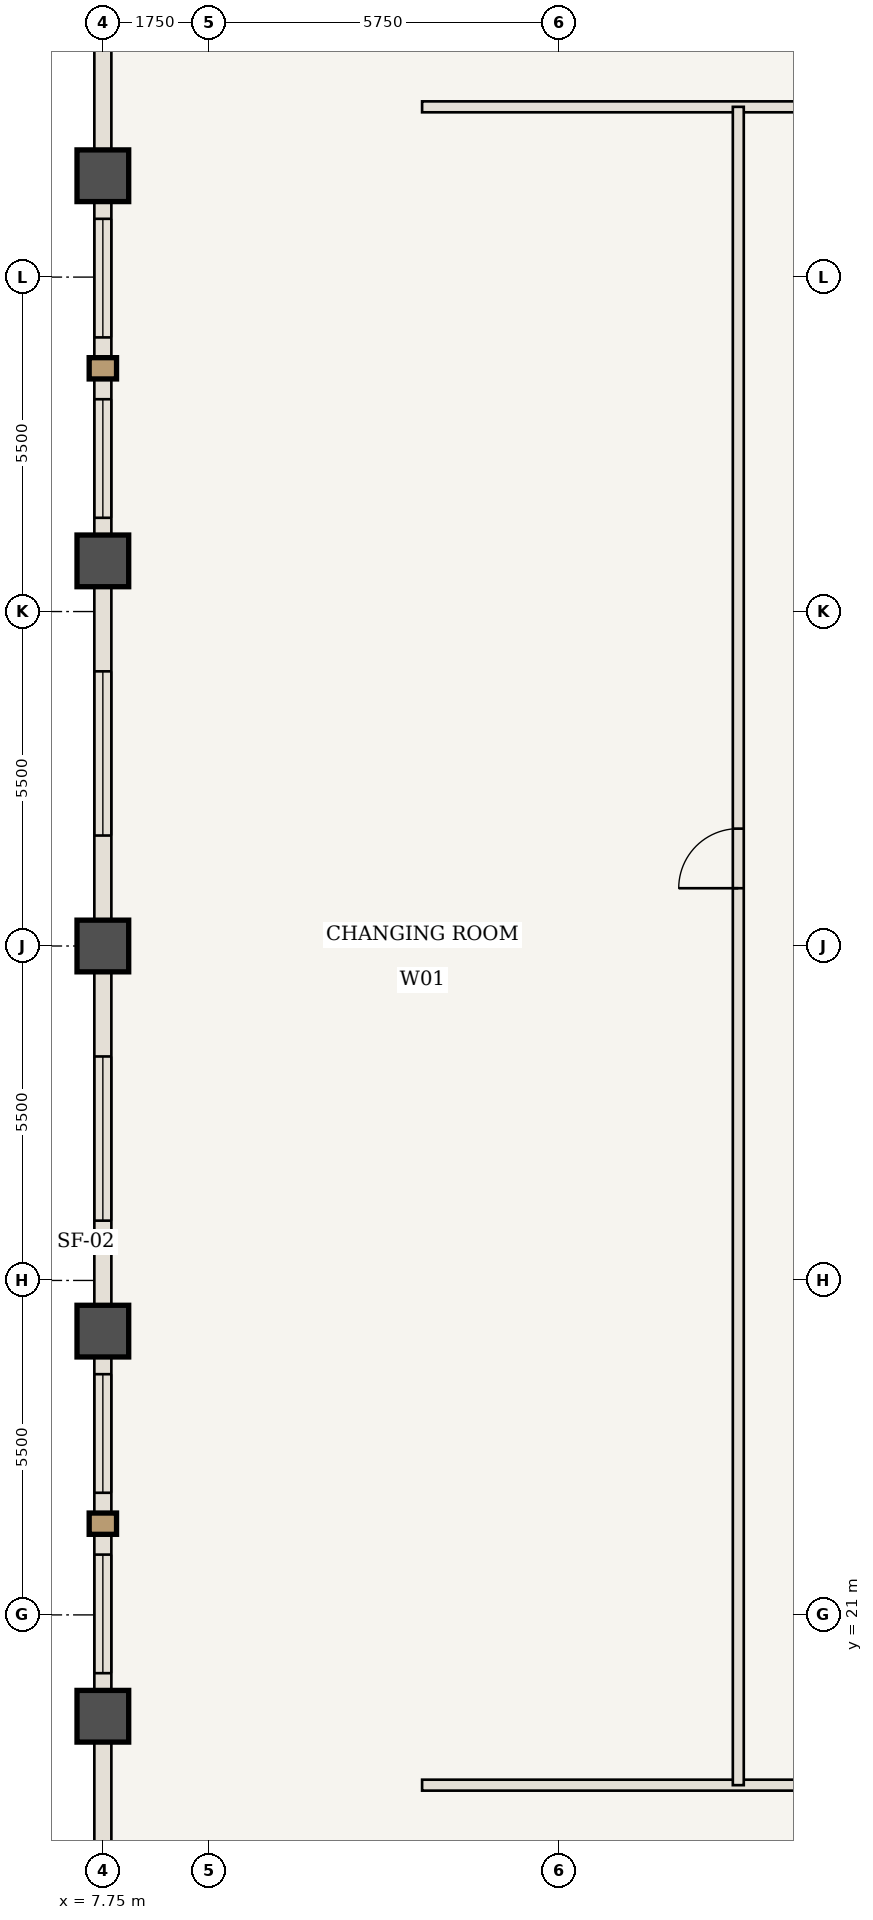
"""IFC4 building model, lengths in metres.
Left out: names, types, materials, properties, quantities, classifications, styles, units other than length and angle.
Written with IfcOpenShell. Run it as: python <this file> out.ifc"""

import sys

from ifc_helpers import new_model, si_unit, direction, frame, frame_2d, origin, origin_2d, place, context, subcontext, project, spatial, rectangle, extrude, element, fill, save


model = new_model("IFC4")
c1 = context("Model", 3, precision=1e-05, world=origin(), true_north=direction((0.0, 1.0)))
c2 = subcontext(c1, "Body", "Model", "MODEL_VIEW")
j1 = project(units=[si_unit("LENGTHUNIT", "METRE"), si_unit("PLANEANGLEUNIT", "RADIAN")], contexts=[c1])
p1 = place(None, origin())
s1 = spatial("IfcSite", under=j1, at=p1, CompositionType="ELEMENT")
p2 = place(p1, origin())
s2 = spatial("IfcBuilding", under=s1, at=p2, CompositionType="ELEMENT")
p3 = place(p2, frame((0.0, 0.0, 244.65)))
s3 = spatial("IfcBuildingStorey", under=s2, at=p3, CompositionType="ELEMENT", Elevation=244.65)
for number, where, z_axis, x_axis in (
    (1, (7.75, 19.333, 0.0), (0.0, 0.0, 1.0), (1.0, 0.0, 0.0)),
    (2, (7.75, 25.667, 0.0), (0.0, 0.0, 1.0), (1.0, 0.0, 0.0)),
    (3, (7.75, 32.0, 0.0), (0.0, 0.0, 1.0), (1.0, 0.0, 0.0)),
    (4, (7.75, 38.333, 0.0), (0.0, 0.0, 1.0), (1.0, 0.0, 0.0)),
    (5, (7.75, 44.667, 0.0), (0.0, 0.0, 1.0), (1.0, 0.0, 0.0)),
):
    element("IfcColumn", number, at=place(p3, frame(where, z_axis=z_axis, x_axis=x_axis)), inside=s3, PredefinedType="COLUMN", context=c2, shape_type="SweptSolid", body=[
        extrude(rectangle(XDim=0.85, YDim=0.85, at=origin_2d()), origin(), (0.0, 0.0, 1.0), 3.85),
    ])
p4 = place(p3, frame((13.0, 18.2, 0.0), z_axis=(0.0, 0.0, 1.0), x_axis=(1.0, 0.0, 0.0)))
e6 = element("IfcWall", 6, at=p4, inside=s3, PredefinedType="STANDARD", context=c2, shape_type="SweptSolid", body=[
    extrude(rectangle(XDim=38.0, YDim=0.18, at=frame_2d((19.0, 0.0))), origin(), (0.0, 0.0, 1.0), 3.685),
])
p5 = place(p4, frame((19.825, 0.0, 0.0)))
e7 = element("IfcOpeningElement", 7, at=p5, cuts=e6, PredefinedType="OPENING", context=c2, shape_type="SweptSolid", body=[
    extrude(rectangle(XDim=0.98, YDim=2.2, at=frame_2d((0.49, 1.1))), frame((0.0, 0.1, 0.0), z_axis=(0.0, -1.0, 0.0), x_axis=(1.0, 0.0, 0.0)), (0.0, 0.0, 1.0), 0.2),
])
p6 = place(p3, frame((13.0, 45.8, 0.0), z_axis=(0.0, 0.0, 1.0), x_axis=(1.0, 0.0, 0.0)))
e8 = element("IfcWall", 8, at=p6, inside=s3, PredefinedType="STANDARD", context=c2, shape_type="SweptSolid", body=[
    extrude(rectangle(XDim=13.592, YDim=0.18, at=frame_2d((6.796, 0.0))), origin(), (0.0, 0.0, 1.0), 3.685),
])
p7 = place(p6, frame((8.896, 0.0, 0.0)))
e9 = element("IfcOpeningElement", 9, at=p7, cuts=e8, PredefinedType="OPENING", context=c2, shape_type="SweptSolid", body=[
    extrude(rectangle(XDim=0.98, YDim=2.2, at=frame_2d((0.49, 1.1))), frame((0.0, 0.1, 0.0), z_axis=(0.0, -1.0, 0.0), x_axis=(1.0, 0.0, 0.0)), (0.0, 0.0, 1.0), 0.2),
])
p8 = place(p3, frame((18.2, 18.2, 0.0), z_axis=(0.0, 0.0, 1.0), x_axis=(0.0, 1.0, 0.0)))
e10 = element("IfcWall", 10, at=p8, inside=s3, PredefinedType="STANDARD", context=c2, shape_type="SweptSolid", body=[
    extrude(rectangle(XDim=27.6, YDim=0.18, at=frame_2d((13.8, 0.0))), origin(), (0.0, 0.0, 1.0), 3.685),
])
p9 = place(p8, frame((14.75, 0.0, 0.0)))
e11 = element("IfcOpeningElement", 11, at=p9, cuts=e10, PredefinedType="OPENING", context=c2, shape_type="SweptSolid", body=[
    extrude(rectangle(XDim=0.98, YDim=2.2, at=frame_2d((0.49, 1.1))), frame((0.0, 0.1, 0.0), z_axis=(0.0, -1.0, 0.0), x_axis=(1.0, 0.0, 0.0)), (0.0, 0.0, 1.0), 0.2),
])
p10 = place(p3, frame((7.75, 13.0, 0.0), z_axis=(0.0, 0.0, 1.0), x_axis=(0.0, 1.0, 0.0)))
e12 = element("IfcWall", 12, at=p10, inside=s3, PredefinedType="USERDEFINED", context=c2, shape_type="SweptSolid", body=[
    extrude(rectangle(XDim=6.333, YDim=0.28, at=frame_2d((3.167, 0.0))), origin(), (0.0, 0.0, 1.0), 2.985),
])
p11 = place(p3, frame((7.75, 19.333, 0.0), z_axis=(0.0, 0.0, 1.0), x_axis=(0.0, 1.0, 0.0)))
e13 = element("IfcWall", 13, at=p11, inside=s3, PredefinedType="USERDEFINED", context=c2, shape_type="SweptSolid", body=[
    extrude(rectangle(XDim=6.333, YDim=0.28, at=frame_2d((3.167, 0.0))), origin(), (0.0, 0.0, 1.0), 2.985),
])
p12 = place(p11, frame((0.708, 0.0, 0.85)))
e14 = element("IfcOpeningElement", 14, at=p12, cuts=e13, PredefinedType="OPENING", context=c2, shape_type="SweptSolid", body=[
    extrude(rectangle(XDim=1.95, YDim=1.935, at=frame_2d((0.975, 0.968))), frame((0.0, 0.15, 0.0), z_axis=(0.0, -1.0, 0.0), x_axis=(1.0, 0.0, 0.0)), (0.0, 0.0, 1.0), 0.3),
])
p13 = place(p11, frame((3.675, 0.0, 0.85)))
e15 = element("IfcOpeningElement", 15, at=p13, cuts=e13, PredefinedType="OPENING", context=c2, shape_type="SweptSolid", body=[
    extrude(rectangle(XDim=1.95, YDim=1.935, at=frame_2d((0.975, 0.968))), frame((0.0, 0.15, 0.0), z_axis=(0.0, -1.0, 0.0), x_axis=(1.0, 0.0, 0.0)), (0.0, 0.0, 1.0), 0.3),
])
p14 = place(p3, frame((7.75, 25.667, 0.0), z_axis=(0.0, 0.0, 1.0), x_axis=(0.0, 1.0, 0.0)))
e16 = element("IfcWall", 16, at=p14, inside=s3, PredefinedType="USERDEFINED", context=c2, shape_type="SweptSolid", body=[
    extrude(rectangle(XDim=6.333, YDim=0.28, at=frame_2d((3.167, 0.0))), origin(), (0.0, 0.0, 1.0), 2.985),
])
p15 = place(p14, frame((1.817, 0.0, 0.85)))
e17 = element("IfcOpeningElement", 17, at=p15, cuts=e16, PredefinedType="OPENING", context=c2, shape_type="SweptSolid", body=[
    extrude(rectangle(XDim=2.7, YDim=1.935, at=frame_2d((1.35, 0.968))), frame((0.0, 0.15, 0.0), z_axis=(0.0, -1.0, 0.0), x_axis=(1.0, 0.0, 0.0)), (0.0, 0.0, 1.0), 0.3),
])
p16 = place(p3, frame((7.75, 32.0, 0.0), z_axis=(0.0, 0.0, 1.0), x_axis=(0.0, 1.0, 0.0)))
e18 = element("IfcWall", 18, at=p16, inside=s3, PredefinedType="USERDEFINED", context=c2, shape_type="SweptSolid", body=[
    extrude(rectangle(XDim=6.333, YDim=0.28, at=frame_2d((3.167, 0.0))), origin(), (0.0, 0.0, 1.0), 2.985),
])
p17 = place(p16, frame((1.817, 0.0, 0.85)))
e19 = element("IfcOpeningElement", 19, at=p17, cuts=e18, PredefinedType="OPENING", context=c2, shape_type="SweptSolid", body=[
    extrude(rectangle(XDim=2.7, YDim=1.935, at=frame_2d((1.35, 0.968))), frame((0.0, 0.15, 0.0), z_axis=(0.0, -1.0, 0.0), x_axis=(1.0, 0.0, 0.0)), (0.0, 0.0, 1.0), 0.3),
])
p18 = place(p3, frame((7.75, 38.333, 0.0), z_axis=(0.0, 0.0, 1.0), x_axis=(0.0, 1.0, 0.0)))
e20 = element("IfcWall", 20, at=p18, inside=s3, PredefinedType="USERDEFINED", context=c2, shape_type="SweptSolid", body=[
    extrude(rectangle(XDim=6.333, YDim=0.28, at=frame_2d((3.167, 0.0))), origin(), (0.0, 0.0, 1.0), 2.985),
])
p19 = place(p18, frame((0.708, 0.0, 0.85)))
e21 = element("IfcOpeningElement", 21, at=p19, cuts=e20, PredefinedType="OPENING", context=c2, shape_type="SweptSolid", body=[
    extrude(rectangle(XDim=1.95, YDim=1.935, at=frame_2d((0.975, 0.968))), frame((0.0, 0.15, 0.0), z_axis=(0.0, -1.0, 0.0), x_axis=(1.0, 0.0, 0.0)), (0.0, 0.0, 1.0), 0.3),
])
p20 = place(p18, frame((3.675, 0.0, 0.85)))
e22 = element("IfcOpeningElement", 22, at=p20, cuts=e20, PredefinedType="OPENING", context=c2, shape_type="SweptSolid", body=[
    extrude(rectangle(XDim=1.95, YDim=1.935, at=frame_2d((0.975, 0.968))), frame((0.0, 0.15, 0.0), z_axis=(0.0, -1.0, 0.0), x_axis=(1.0, 0.0, 0.0)), (0.0, 0.0, 1.0), 0.3),
])
p21 = place(p3, frame((7.75, 44.667, 0.0), z_axis=(0.0, 0.0, 1.0), x_axis=(0.0, 1.0, 0.0)))
e23 = element("IfcWall", 23, at=p21, inside=s3, PredefinedType="USERDEFINED", context=c2, shape_type="SweptSolid", body=[
    extrude(rectangle(XDim=6.333, YDim=0.28, at=frame_2d((3.167, 0.0))), origin(), (0.0, 0.0, 1.0), 2.985),
])
p22 = place(p9, origin())
e24 = element("IfcDoor", 24, at=p22, inside=s3, OperationType="SINGLE_SWING_LEFT", PredefinedType="DOOR", context=c2, shape_type="SweptSolid", body=[
    extrude(rectangle(XDim=0.98, YDim=2.2, at=frame_2d((0.49, 1.1))), frame((0.0, 0.025, 0.0), z_axis=(0.0, -1.0, 0.0), x_axis=(1.0, 0.0, 0.0)), (0.0, 0.0, 1.0), 0.05),
])
fill(e11, e24)
p23 = place(p12, origin())
e25 = element("IfcWindow", 25, at=p23, inside=s3, PartitioningType="SINGLE_PANEL", PredefinedType="WINDOW", context=c2, shape_type="SweptSolid", body=[
    extrude(rectangle(XDim=1.95, YDim=1.935, at=frame_2d((0.975, 0.968))), frame((0.0, 0.03, 0.0), z_axis=(0.0, -1.0, 0.0), x_axis=(1.0, 0.0, 0.0)), (0.0, 0.0, 1.0), 0.06),
])
fill(e14, e25)
p24 = place(p13, origin())
e26 = element("IfcWindow", 26, at=p24, inside=s3, PartitioningType="SINGLE_PANEL", PredefinedType="WINDOW", context=c2, shape_type="SweptSolid", body=[
    extrude(rectangle(XDim=1.95, YDim=1.935, at=frame_2d((0.975, 0.968))), frame((0.0, 0.03, 0.0), z_axis=(0.0, -1.0, 0.0), x_axis=(1.0, 0.0, 0.0)), (0.0, 0.0, 1.0), 0.06),
])
fill(e15, e26)
p25 = place(p15, origin())
e27 = element("IfcWindow", 27, at=p25, inside=s3, PartitioningType="SINGLE_PANEL", PredefinedType="WINDOW", context=c2, shape_type="SweptSolid", body=[
    extrude(rectangle(XDim=2.7, YDim=1.935, at=frame_2d((1.35, 0.968))), frame((0.0, 0.03, 0.0), z_axis=(0.0, -1.0, 0.0), x_axis=(1.0, 0.0, 0.0)), (0.0, 0.0, 1.0), 0.06),
])
fill(e17, e27)
p26 = place(p17, origin())
e28 = element("IfcWindow", 28, at=p26, inside=s3, PartitioningType="SINGLE_PANEL", PredefinedType="WINDOW", context=c2, shape_type="SweptSolid", body=[
    extrude(rectangle(XDim=2.7, YDim=1.935, at=frame_2d((1.35, 0.968))), frame((0.0, 0.03, 0.0), z_axis=(0.0, -1.0, 0.0), x_axis=(1.0, 0.0, 0.0)), (0.0, 0.0, 1.0), 0.06),
])
fill(e19, e28)
p27 = place(p19, origin())
e29 = element("IfcWindow", 29, at=p27, inside=s3, PartitioningType="SINGLE_PANEL", PredefinedType="WINDOW", context=c2, shape_type="SweptSolid", body=[
    extrude(rectangle(XDim=1.95, YDim=1.935, at=frame_2d((0.975, 0.968))), frame((0.0, 0.03, 0.0), z_axis=(0.0, -1.0, 0.0), x_axis=(1.0, 0.0, 0.0)), (0.0, 0.0, 1.0), 0.06),
])
fill(e21, e29)
p28 = place(p20, origin())
e30 = element("IfcWindow", 30, at=p28, inside=s3, PartitioningType="SINGLE_PANEL", PredefinedType="WINDOW", context=c2, shape_type="SweptSolid", body=[
    extrude(rectangle(XDim=1.95, YDim=1.935, at=frame_2d((0.975, 0.968))), frame((0.0, 0.03, 0.0), z_axis=(0.0, -1.0, 0.0), x_axis=(1.0, 0.0, 0.0)), (0.0, 0.0, 1.0), 0.06),
])
fill(e22, e30)
save(model, sys.argv[1])
